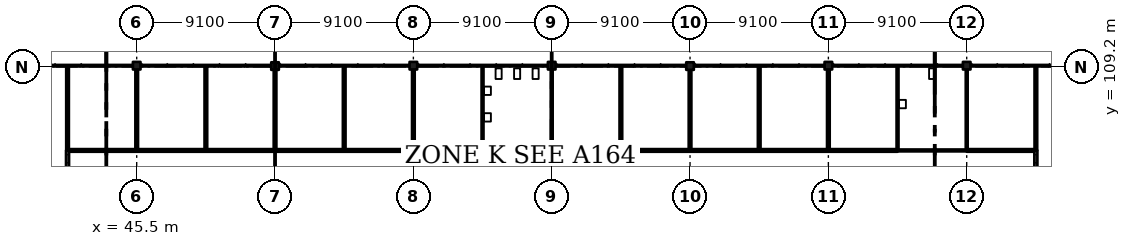
"""IFC4 building model, lengths in metres.
Left out: names, types, materials, properties, quantities, classifications, styles, units other than length and angle.
Written with IfcOpenShell. Run it as: python <this file> out.ifc"""

import sys

from ifc_helpers import new_model, si_unit, direction, frame, frame_2d, origin, origin_2d, place, context, subcontext, project, spatial, rectangle, extrude, element, fill, save


model = new_model("IFC4")
c1 = context("Model", 3, precision=1e-05, world=origin(), true_north=direction((0.0, 1.0)))
c2 = subcontext(c1, "Body", "Model", "MODEL_VIEW")
j1 = project(units=[si_unit("LENGTHUNIT", "METRE"), si_unit("PLANEANGLEUNIT", "RADIAN")], contexts=[c1])
p1 = place(None, origin())
s1 = spatial("IfcSite", under=j1, at=p1, CompositionType="ELEMENT")
p2 = place(p1, origin())
s2 = spatial("IfcBuilding", under=s1, at=p2, CompositionType="ELEMENT")
p3 = place(p2, frame((0.0, 0.0, 20.02)))
s3 = spatial("IfcBuildingStorey", under=s2, at=p3, CompositionType="ELEMENT", Elevation=20.02)
for number, where, z_axis, x_axis in (
    (1, (45.5, 109.275, 0.0), (0.0, 0.0, 1.0), (1.0, 0.0, 0.0)),
    (2, (54.6, 109.25, 0.0), (0.0, 0.0, 1.0), (1.0, 0.0, 0.0)),
    (3, (63.7, 109.275, 0.0), (0.0, 0.0, 1.0), (1.0, 0.0, 0.0)),
    (4, (72.8, 109.275, 0.0), (0.0, 0.0, 1.0), (1.0, 0.0, 0.0)),
    (5, (81.9, 109.25, 0.0), (0.0, 0.0, 1.0), (1.0, 0.0, 0.0)),
    (6, (91.0, 109.275, 0.0), (0.0, 0.0, 1.0), (1.0, 0.0, 0.0)),
    (7, (100.1, 109.275, 0.0), (0.0, 0.0, 1.0), (1.0, 0.0, 0.0)),
):
    element("IfcColumn", number, at=place(p3, frame(where, z_axis=z_axis, x_axis=x_axis)), inside=s3, PredefinedType="COLUMN", context=c2, shape_type="SweptSolid", body=[
        extrude(rectangle(XDim=0.5, YDim=0.5, at=origin_2d()), origin(), (0.0, 0.0, 1.0), 4.55),
    ])
p4 = place(p3, frame((40.95, 103.7, 0.0), z_axis=(0.0, 0.0, 1.0), x_axis=(0.0, -1.0, 0.0)))
e8 = element("IfcWall", 8, at=p4, inside=s3, PredefinedType="PARTITIONING", context=c2, shape_type="SweptSolid", body=[
    extrude(rectangle(XDim=3.57, YDim=0.2, at=frame_2d((1.785, 0.0))), origin(), (0.0, 0.0, 1.0), 4.25),
])
p5 = place(p4, frame((0.55, 0.0, 0.0)))
e9 = element("IfcOpeningElement", 9, at=p5, cuts=e8, PredefinedType="OPENING", context=c2, shape_type="SweptSolid", body=[
    extrude(rectangle(XDim=2.4, YDim=2.4, at=frame_2d((1.2, 1.2))), frame((0.0, 0.11, 0.0), z_axis=(0.0, -1.0, 0.0), x_axis=(1.0, 0.0, 0.0)), (0.0, 0.0, 1.0), 0.22),
])
p6 = place(p3, frame((40.95, 103.7, 0.0), z_axis=(0.0, 0.0, 1.0), x_axis=(0.0, 1.0, 0.0)))
e10 = element("IfcWall", 10, at=p6, inside=s3, PredefinedType="PARTITIONING", context=c2, shape_type="SweptSolid", body=[
    extrude(rectangle(XDim=5.47, YDim=0.175, at=frame_2d((2.735, 0.0))), origin(), (0.0, 0.0, 1.0), 4.25),
])
p7 = place(p3, frame((41.05, 103.7, 0.0), z_axis=(0.0, 0.0, 1.0), x_axis=(1.0, 0.0, 0.0)))
e11 = element("IfcWall", 11, at=p7, inside=s3, PredefinedType="PARTITIONING", context=c2, shape_type="SweptSolid", body=[
    extrude(rectangle(XDim=27.2, YDim=0.175, at=frame_2d((13.6, 0.0))), origin(), (0.0, 0.0, 1.0), 4.25),
])
p8 = place(p7, frame((1.65, 0.0, 0.0)))
e12 = element("IfcOpeningElement", 12, at=p8, cuts=e11, PredefinedType="OPENING", context=c2, shape_type="SweptSolid", body=[
    extrude(rectangle(XDim=1.1, YDim=2.4, at=frame_2d((0.55, 1.2))), frame((0.0, 0.097, 0.0), z_axis=(0.0, -1.0, 0.0), x_axis=(1.0, 0.0, 0.0)), (0.0, 0.0, 1.0), 0.195),
])
p9 = place(p7, frame((6.2, 0.0, 0.0)))
e13 = element("IfcOpeningElement", 13, at=p9, cuts=e11, PredefinedType="OPENING", context=c2, shape_type="SweptSolid", body=[
    extrude(rectangle(XDim=1.1, YDim=2.4, at=frame_2d((0.55, 1.2))), frame((0.0, 0.097, 0.0), z_axis=(0.0, -1.0, 0.0), x_axis=(1.0, 0.0, 0.0)), (0.0, 0.0, 1.0), 0.195),
])
p10 = place(p7, frame((10.75, 0.0, 0.0)))
e14 = element("IfcOpeningElement", 14, at=p10, cuts=e11, PredefinedType="OPENING", context=c2, shape_type="SweptSolid", body=[
    extrude(rectangle(XDim=1.1, YDim=2.4, at=frame_2d((0.55, 1.2))), frame((0.0, 0.097, 0.0), z_axis=(0.0, -1.0, 0.0), x_axis=(1.0, 0.0, 0.0)), (0.0, 0.0, 1.0), 0.195),
])
p11 = place(p7, frame((15.3, 0.0, 0.0)))
e15 = element("IfcOpeningElement", 15, at=p11, cuts=e11, PredefinedType="OPENING", context=c2, shape_type="SweptSolid", body=[
    extrude(rectangle(XDim=1.1, YDim=2.4, at=frame_2d((0.55, 1.2))), frame((0.0, 0.097, 0.0), z_axis=(0.0, -1.0, 0.0), x_axis=(1.0, 0.0, 0.0)), (0.0, 0.0, 1.0), 0.195),
])
p12 = place(p7, frame((19.85, 0.0, 0.0)))
e16 = element("IfcOpeningElement", 16, at=p12, cuts=e11, PredefinedType="OPENING", context=c2, shape_type="SweptSolid", body=[
    extrude(rectangle(XDim=1.1, YDim=2.4, at=frame_2d((0.55, 1.2))), frame((0.0, 0.097, 0.0), z_axis=(0.0, -1.0, 0.0), x_axis=(1.0, 0.0, 0.0)), (0.0, 0.0, 1.0), 0.195),
])
p13 = place(p7, frame((24.4, 0.0, 0.0)))
e17 = element("IfcOpeningElement", 17, at=p13, cuts=e11, PredefinedType="OPENING", context=c2, shape_type="SweptSolid", body=[
    extrude(rectangle(XDim=1.1, YDim=2.4, at=frame_2d((0.55, 1.2))), frame((0.0, 0.097, 0.0), z_axis=(0.0, -1.0, 0.0), x_axis=(1.0, 0.0, 0.0)), (0.0, 0.0, 1.0), 0.195),
])
p14 = place(p3, frame((45.5, 109.025, 0.0), z_axis=(0.0, 0.0, 1.0), x_axis=(0.0, -1.0, 0.0)))
e18 = element("IfcWall", 18, at=p14, inside=s3, PredefinedType="PARTITIONING", context=c2, shape_type="SweptSolid", body=[
    extrude(rectangle(XDim=5.237, YDim=0.175, at=frame_2d((2.619, 0.0))), origin(), (0.0, 0.0, 1.0), 3.55),
])
p15 = place(p3, frame((50.05, 109.17, 0.0), z_axis=(0.0, 0.0, 1.0), x_axis=(0.0, -1.0, 0.0)))
e19 = element("IfcWall", 19, at=p15, inside=s3, PredefinedType="PARTITIONING", context=c2, shape_type="SweptSolid", body=[
    extrude(rectangle(XDim=5.382, YDim=0.175, at=frame_2d((2.691, 0.0))), origin(), (0.0, 0.0, 1.0), 4.25),
])
p16 = place(p3, frame((54.6, 109.0, 0.0), z_axis=(0.0, 0.0, 1.0), x_axis=(0.0, -1.0, 0.0)))
e20 = element("IfcWall", 20, at=p16, inside=s3, PredefinedType="PARTITIONING", context=c2, shape_type="SweptSolid", body=[
    extrude(rectangle(XDim=5.212, YDim=0.175, at=frame_2d((2.606, 0.0))), origin(), (0.0, 0.0, 1.0), 3.55),
])
p17 = place(p3, frame((59.15, 109.17, 0.0), z_axis=(0.0, 0.0, 1.0), x_axis=(0.0, -1.0, 0.0)))
e21 = element("IfcWall", 21, at=p17, inside=s3, PredefinedType="PARTITIONING", context=c2, shape_type="SweptSolid", body=[
    extrude(rectangle(XDim=5.382, YDim=0.175, at=frame_2d((2.691, 0.0))), origin(), (0.0, 0.0, 1.0), 4.25),
])
p18 = place(p3, frame((63.7, 109.025, 0.0), z_axis=(0.0, 0.0, 1.0), x_axis=(0.0, -1.0, 0.0)))
e22 = element("IfcWall", 22, at=p18, inside=s3, PredefinedType="PARTITIONING", context=c2, shape_type="SweptSolid", body=[
    extrude(rectangle(XDim=5.237, YDim=0.175, at=frame_2d((2.619, 0.0))), origin(), (0.0, 0.0, 1.0), 3.55),
])
p19 = place(p3, frame((68.25, 103.7, 0.0), z_axis=(0.0, 0.0, 1.0), x_axis=(1.0, 0.0, 0.0)))
e23 = element("IfcWall", 23, at=p19, inside=s3, PredefinedType="PARTITIONING", context=c2, shape_type="SweptSolid", body=[
    extrude(rectangle(XDim=4.55, YDim=0.125, at=frame_2d((2.275, 0.0))), origin(), (0.0, 0.0, 1.0), 4.25),
])
p20 = place(p19, frame((1.85, 0.0, 0.0)))
e24 = element("IfcOpeningElement", 24, at=p20, cuts=e23, PredefinedType="OPENING", context=c2, shape_type="SweptSolid", body=[
    extrude(rectangle(XDim=0.9, YDim=2.1, at=frame_2d((0.45, 1.05))), frame((0.0, 0.073, 0.0), z_axis=(0.0, -1.0, 0.0), x_axis=(1.0, 0.0, 0.0)), (0.0, 0.0, 1.0), 0.145),
])
p21 = place(p3, frame((68.25, 109.17, 0.0), z_axis=(0.0, 0.0, 1.0), x_axis=(0.0, -1.0, 0.0)))
e25 = element("IfcWall", 25, at=p21, inside=s3, PredefinedType="PARTITIONING", context=c2, shape_type="SweptSolid", body=[
    extrude(rectangle(XDim=5.382, YDim=0.125, at=frame_2d((2.691, 0.0))), origin(), (0.0, 0.0, 1.0), 4.25),
])
p22 = place(p3, frame((72.8, 103.7, 0.0), z_axis=(0.0, 0.0, 1.0), x_axis=(1.0, 0.0, 0.0)))
e26 = element("IfcWall", 26, at=p22, inside=s3, PredefinedType="PARTITIONING", context=c2, shape_type="SweptSolid", body=[
    extrude(rectangle(XDim=22.75, YDim=0.175, at=frame_2d((11.375, 0.0))), origin(), (0.0, 0.0, 1.0), 4.25),
])
p23 = place(p22, frame((10.85, 0.0, 0.0)))
e27 = element("IfcOpeningElement", 27, at=p23, cuts=e26, PredefinedType="OPENING", context=c2, shape_type="SweptSolid", body=[
    extrude(rectangle(XDim=1.1, YDim=2.4, at=frame_2d((0.55, 1.2))), frame((0.0, 0.097, 0.0), z_axis=(0.0, -1.0, 0.0), x_axis=(1.0, 0.0, 0.0)), (0.0, 0.0, 1.0), 0.195),
])
p24 = place(p22, frame((15.4, 0.0, 0.0)))
e28 = element("IfcOpeningElement", 28, at=p24, cuts=e26, PredefinedType="OPENING", context=c2, shape_type="SweptSolid", body=[
    extrude(rectangle(XDim=1.1, YDim=2.4, at=frame_2d((0.55, 1.2))), frame((0.0, 0.097, 0.0), z_axis=(0.0, -1.0, 0.0), x_axis=(1.0, 0.0, 0.0)), (0.0, 0.0, 1.0), 0.195),
])
p25 = place(p22, frame((19.95, 0.0, 0.0)))
e29 = element("IfcOpeningElement", 29, at=p25, cuts=e26, PredefinedType="OPENING", context=c2, shape_type="SweptSolid", body=[
    extrude(rectangle(XDim=1.1, YDim=2.4, at=frame_2d((0.55, 1.2))), frame((0.0, 0.097, 0.0), z_axis=(0.0, -1.0, 0.0), x_axis=(1.0, 0.0, 0.0)), (0.0, 0.0, 1.0), 0.195),
])
p26 = place(p22, frame((1.75, 0.0, 0.0)))
e30 = element("IfcOpeningElement", 30, at=p26, cuts=e26, PredefinedType="OPENING", context=c2, shape_type="SweptSolid", body=[
    extrude(rectangle(XDim=1.1, YDim=2.4, at=frame_2d((0.55, 1.2))), frame((0.0, 0.097, 0.0), z_axis=(0.0, -1.0, 0.0), x_axis=(1.0, 0.0, 0.0)), (0.0, 0.0, 1.0), 0.195),
])
p27 = place(p22, frame((6.3, 0.0, 0.0)))
e31 = element("IfcOpeningElement", 31, at=p27, cuts=e26, PredefinedType="OPENING", context=c2, shape_type="SweptSolid", body=[
    extrude(rectangle(XDim=1.1, YDim=2.4, at=frame_2d((0.55, 1.2))), frame((0.0, 0.097, 0.0), z_axis=(0.0, -1.0, 0.0), x_axis=(1.0, 0.0, 0.0)), (0.0, 0.0, 1.0), 0.195),
])
p28 = place(p3, frame((72.8, 109.025, 0.0), z_axis=(0.0, 0.0, 1.0), x_axis=(0.0, -1.0, 0.0)))
e32 = element("IfcWall", 32, at=p28, inside=s3, PredefinedType="PARTITIONING", context=c2, shape_type="SweptSolid", body=[
    extrude(rectangle(XDim=5.237, YDim=0.125, at=frame_2d((2.619, 0.0))), origin(), (0.0, 0.0, 1.0), 3.55),
])
p29 = place(p3, frame((77.35, 109.17, 0.0), z_axis=(0.0, 0.0, 1.0), x_axis=(0.0, -1.0, 0.0)))
e33 = element("IfcWall", 33, at=p29, inside=s3, PredefinedType="PARTITIONING", context=c2, shape_type="SweptSolid", body=[
    extrude(rectangle(XDim=5.382, YDim=0.175, at=frame_2d((2.691, 0.0))), origin(), (0.0, 0.0, 1.0), 4.25),
])
p30 = place(p3, frame((81.9, 109.0, 0.0), z_axis=(0.0, 0.0, 1.0), x_axis=(0.0, -1.0, 0.0)))
e34 = element("IfcWall", 34, at=p30, inside=s3, PredefinedType="PARTITIONING", context=c2, shape_type="SweptSolid", body=[
    extrude(rectangle(XDim=5.212, YDim=0.175, at=frame_2d((2.606, 0.0))), origin(), (0.0, 0.0, 1.0), 3.55),
])
p31 = place(p3, frame((86.45, 109.17, 0.0), z_axis=(0.0, 0.0, 1.0), x_axis=(0.0, -1.0, 0.0)))
e35 = element("IfcWall", 35, at=p31, inside=s3, PredefinedType="PARTITIONING", context=c2, shape_type="SweptSolid", body=[
    extrude(rectangle(XDim=5.382, YDim=0.175, at=frame_2d((2.691, 0.0))), origin(), (0.0, 0.0, 1.0), 4.25),
])
p32 = place(p3, frame((91.0, 109.025, 0.0), z_axis=(0.0, 0.0, 1.0), x_axis=(0.0, -1.0, 0.0)))
e36 = element("IfcWall", 36, at=p32, inside=s3, PredefinedType="PARTITIONING", context=c2, shape_type="SweptSolid", body=[
    extrude(rectangle(XDim=5.237, YDim=0.175, at=frame_2d((2.619, 0.0))), origin(), (0.0, 0.0, 1.0), 3.55),
])
p33 = place(p3, frame((95.55, 103.7, 0.0), z_axis=(0.0, 0.0, 1.0), x_axis=(1.0, 0.0, 0.0)))
e37 = element("IfcWall", 37, at=p33, inside=s3, PredefinedType="PARTITIONING", context=c2, shape_type="SweptSolid", body=[
    extrude(rectangle(XDim=4.55, YDim=0.125, at=frame_2d((2.275, 0.0))), origin(), (0.0, 0.0, 1.0), 4.25),
])
p34 = place(p33, frame((1.75, 0.0, 0.0)))
e38 = element("IfcOpeningElement", 38, at=p34, cuts=e37, PredefinedType="OPENING", context=c2, shape_type="SweptSolid", body=[
    extrude(rectangle(XDim=1.0, YDim=2.1, at=frame_2d((0.5, 1.05))), frame((0.0, 0.073, 0.0), z_axis=(0.0, -1.0, 0.0), x_axis=(1.0, 0.0, 0.0)), (0.0, 0.0, 1.0), 0.145),
])
p35 = place(p3, frame((95.55, 109.17, 0.0), z_axis=(0.0, 0.0, 1.0), x_axis=(0.0, -1.0, 0.0)))
e39 = element("IfcWall", 39, at=p35, inside=s3, PredefinedType="PARTITIONING", context=c2, shape_type="SweptSolid", body=[
    extrude(rectangle(XDim=5.382, YDim=0.125, at=frame_2d((2.691, 0.0))), origin(), (0.0, 0.0, 1.0), 4.25),
])
p36 = place(p3, frame((100.1, 103.7, 0.0), z_axis=(0.0, 0.0, 1.0), x_axis=(1.0, 0.0, 0.0)))
e40 = element("IfcWall", 40, at=p36, inside=s3, PredefinedType="PARTITIONING", context=c2, shape_type="SweptSolid", body=[
    extrude(rectangle(XDim=4.45, YDim=0.175, at=frame_2d((2.225, 0.0))), origin(), (0.0, 0.0, 1.0), 4.25),
])
p37 = place(p36, frame((1.65, 0.0, 0.0)))
e41 = element("IfcOpeningElement", 41, at=p37, cuts=e40, PredefinedType="OPENING", context=c2, shape_type="SweptSolid", body=[
    extrude(rectangle(XDim=1.1, YDim=2.4, at=frame_2d((0.55, 1.2))), frame((0.0, 0.097, 0.0), z_axis=(0.0, -1.0, 0.0), x_axis=(1.0, 0.0, 0.0)), (0.0, 0.0, 1.0), 0.195),
])
p38 = place(p3, frame((100.1, 109.025, 0.0), z_axis=(0.0, 0.0, 1.0), x_axis=(0.0, -1.0, 0.0)))
e42 = element("IfcWall", 42, at=p38, inside=s3, PredefinedType="PARTITIONING", context=c2, shape_type="SweptSolid", body=[
    extrude(rectangle(XDim=5.237, YDim=0.125, at=frame_2d((2.619, 0.0))), origin(), (0.0, 0.0, 1.0), 3.55),
])
p39 = place(p3, frame((104.65, 100.13, 0.0), z_axis=(0.0, 0.0, 1.0), x_axis=(0.0, 1.0, 0.0)))
e43 = element("IfcWall", 43, at=p39, inside=s3, PredefinedType="PARTITIONING", context=c2, shape_type="SweptSolid", body=[
    extrude(rectangle(XDim=3.57, YDim=0.2, at=frame_2d((1.785, 0.0))), origin(), (0.0, 0.0, 1.0), 4.25),
])
p40 = place(p39, frame((0.55, 0.0, 0.0)))
e44 = element("IfcOpeningElement", 44, at=p40, cuts=e43, PredefinedType="OPENING", context=c2, shape_type="SweptSolid", body=[
    extrude(rectangle(XDim=2.4, YDim=2.4, at=frame_2d((1.2, 1.2))), frame((0.0, 0.11, 0.0), z_axis=(0.0, -1.0, 0.0), x_axis=(1.0, 0.0, 0.0)), (0.0, 0.0, 1.0), 0.22),
])
p41 = place(p3, frame((104.65, 103.7, 0.0), z_axis=(0.0, 0.0, 1.0), x_axis=(0.0, 1.0, 0.0)))
e45 = element("IfcWall", 45, at=p41, inside=s3, PredefinedType="PARTITIONING", context=c2, shape_type="SweptSolid", body=[
    extrude(rectangle(XDim=5.47, YDim=0.175, at=frame_2d((2.735, 0.0))), origin(), (0.0, 0.0, 1.0), 4.25),
])
p42 = place(p8, origin())
e46 = element("IfcDoor", 46, at=p42, inside=s3, OperationType="SINGLE_SWING_RIGHT", PredefinedType="DOOR", context=c2, shape_type="SweptSolid", body=[
    extrude(rectangle(XDim=1.1, YDim=2.4, at=frame_2d((0.55, 1.2))), frame((0.0, 0.025, 0.0), z_axis=(0.0, -1.0, 0.0), x_axis=(1.0, 0.0, 0.0)), (0.0, 0.0, 1.0), 0.05),
])
fill(e12, e46)
p43 = place(p23, origin())
e47 = element("IfcDoor", 47, at=p43, inside=s3, OperationType="SINGLE_SWING_LEFT", PredefinedType="DOOR", context=c2, shape_type="SweptSolid", body=[
    extrude(rectangle(XDim=1.1, YDim=2.4, at=frame_2d((0.55, 1.2))), frame((0.0, 0.025, 0.0), z_axis=(0.0, -1.0, 0.0), x_axis=(1.0, 0.0, 0.0)), (0.0, 0.0, 1.0), 0.05),
])
fill(e27, e47)
p44 = place(p24, origin())
e48 = element("IfcDoor", 48, at=p44, inside=s3, OperationType="SINGLE_SWING_LEFT", PredefinedType="DOOR", context=c2, shape_type="SweptSolid", body=[
    extrude(rectangle(XDim=1.1, YDim=2.4, at=frame_2d((0.55, 1.2))), frame((0.0, 0.025, 0.0), z_axis=(0.0, -1.0, 0.0), x_axis=(1.0, 0.0, 0.0)), (0.0, 0.0, 1.0), 0.05),
])
fill(e28, e48)
p45 = place(p25, origin())
e49 = element("IfcDoor", 49, at=p45, inside=s3, OperationType="SINGLE_SWING_LEFT", PredefinedType="DOOR", context=c2, shape_type="SweptSolid", body=[
    extrude(rectangle(XDim=1.1, YDim=2.4, at=frame_2d((0.55, 1.2))), frame((0.0, 0.025, 0.0), z_axis=(0.0, -1.0, 0.0), x_axis=(1.0, 0.0, 0.0)), (0.0, 0.0, 1.0), 0.05),
])
fill(e29, e49)
p46 = place(p34, origin())
e50 = element("IfcDoor", 50, at=p46, inside=s3, OperationType="SINGLE_SWING_RIGHT", PredefinedType="DOOR", context=c2, shape_type="SweptSolid", body=[
    extrude(rectangle(XDim=1.0, YDim=2.1, at=frame_2d((0.5, 1.05))), frame((0.0, 0.025, 0.0), z_axis=(0.0, -1.0, 0.0), x_axis=(1.0, 0.0, 0.0)), (0.0, 0.0, 1.0), 0.05),
])
fill(e38, e50)
p47 = place(p37, origin())
e51 = element("IfcDoor", 51, at=p47, inside=s3, OperationType="SINGLE_SWING_RIGHT", PredefinedType="DOOR", context=c2, shape_type="SweptSolid", body=[
    extrude(rectangle(XDim=1.1, YDim=2.4, at=frame_2d((0.55, 1.2))), frame((0.0, 0.025, 0.0), z_axis=(0.0, -1.0, 0.0), x_axis=(1.0, 0.0, 0.0)), (0.0, 0.0, 1.0), 0.05),
])
fill(e41, e51)
p48 = place(p9, origin())
e52 = element("IfcDoor", 52, at=p48, inside=s3, OperationType="SINGLE_SWING_LEFT", PredefinedType="DOOR", context=c2, shape_type="SweptSolid", body=[
    extrude(rectangle(XDim=1.1, YDim=2.4, at=frame_2d((0.55, 1.2))), frame((0.0, 0.025, 0.0), z_axis=(0.0, -1.0, 0.0), x_axis=(1.0, 0.0, 0.0)), (0.0, 0.0, 1.0), 0.05),
])
fill(e13, e52)
p49 = place(p10, origin())
e53 = element("IfcDoor", 53, at=p49, inside=s3, OperationType="SINGLE_SWING_LEFT", PredefinedType="DOOR", context=c2, shape_type="SweptSolid", body=[
    extrude(rectangle(XDim=1.1, YDim=2.4, at=frame_2d((0.55, 1.2))), frame((0.0, 0.025, 0.0), z_axis=(0.0, -1.0, 0.0), x_axis=(1.0, 0.0, 0.0)), (0.0, 0.0, 1.0), 0.05),
])
fill(e14, e53)
p50 = place(p11, origin())
e54 = element("IfcDoor", 54, at=p50, inside=s3, OperationType="SINGLE_SWING_LEFT", PredefinedType="DOOR", context=c2, shape_type="SweptSolid", body=[
    extrude(rectangle(XDim=1.1, YDim=2.4, at=frame_2d((0.55, 1.2))), frame((0.0, 0.025, 0.0), z_axis=(0.0, -1.0, 0.0), x_axis=(1.0, 0.0, 0.0)), (0.0, 0.0, 1.0), 0.05),
])
fill(e15, e54)
p51 = place(p12, origin())
e55 = element("IfcDoor", 55, at=p51, inside=s3, OperationType="SINGLE_SWING_LEFT", PredefinedType="DOOR", context=c2, shape_type="SweptSolid", body=[
    extrude(rectangle(XDim=1.1, YDim=2.4, at=frame_2d((0.55, 1.2))), frame((0.0, 0.025, 0.0), z_axis=(0.0, -1.0, 0.0), x_axis=(1.0, 0.0, 0.0)), (0.0, 0.0, 1.0), 0.05),
])
fill(e16, e55)
p52 = place(p13, origin())
e56 = element("IfcDoor", 56, at=p52, inside=s3, OperationType="SINGLE_SWING_LEFT", PredefinedType="DOOR", context=c2, shape_type="SweptSolid", body=[
    extrude(rectangle(XDim=1.1, YDim=2.4, at=frame_2d((0.55, 1.2))), frame((0.0, 0.025, 0.0), z_axis=(0.0, -1.0, 0.0), x_axis=(1.0, 0.0, 0.0)), (0.0, 0.0, 1.0), 0.05),
])
fill(e17, e56)
p53 = place(p20, origin())
e57 = element("IfcDoor", 57, at=p53, inside=s3, OperationType="SINGLE_SWING_LEFT", PredefinedType="DOOR", context=c2, shape_type="SweptSolid", body=[
    extrude(rectangle(XDim=0.9, YDim=2.1, at=frame_2d((0.45, 1.05))), frame((0.0, 0.025, 0.0), z_axis=(0.0, -1.0, 0.0), x_axis=(1.0, 0.0, 0.0)), (0.0, 0.0, 1.0), 0.05),
])
fill(e24, e57)
p54 = place(p26, origin())
e58 = element("IfcDoor", 58, at=p54, inside=s3, OperationType="SINGLE_SWING_LEFT", PredefinedType="DOOR", context=c2, shape_type="SweptSolid", body=[
    extrude(rectangle(XDim=1.1, YDim=2.4, at=frame_2d((0.55, 1.2))), frame((0.0, 0.025, 0.0), z_axis=(0.0, -1.0, 0.0), x_axis=(1.0, 0.0, 0.0)), (0.0, 0.0, 1.0), 0.05),
])
fill(e30, e58)
p55 = place(p27, origin())
e59 = element("IfcDoor", 59, at=p55, inside=s3, OperationType="SINGLE_SWING_LEFT", PredefinedType="DOOR", context=c2, shape_type="SweptSolid", body=[
    extrude(rectangle(XDim=1.1, YDim=2.4, at=frame_2d((0.55, 1.2))), frame((0.0, 0.025, 0.0), z_axis=(0.0, -1.0, 0.0), x_axis=(1.0, 0.0, 0.0)), (0.0, 0.0, 1.0), 0.05),
])
fill(e31, e59)
p56 = place(p40, origin())
e60 = element("IfcDoor", 60, at=p56, inside=s3, OperationType="DOUBLE_DOOR_SINGLE_SWING", PredefinedType="DOOR", context=c2, shape_type="SweptSolid", body=[
    extrude(rectangle(XDim=2.4, YDim=2.4, at=frame_2d((1.2, 1.2))), frame((0.0, 0.025, 0.0), z_axis=(0.0, -1.0, 0.0), x_axis=(1.0, 0.0, 0.0)), (0.0, 0.0, 1.0), 0.05),
])
fill(e44, e60)
p57 = place(p5, origin())
e61 = element("IfcDoor", 61, at=p57, inside=s3, OperationType="DOUBLE_DOOR_SINGLE_SWING", PredefinedType="DOOR", context=c2, shape_type="SweptSolid", body=[
    extrude(rectangle(XDim=2.4, YDim=2.4, at=frame_2d((1.2, 1.2))), frame((0.0, 0.025, 0.0), z_axis=(0.0, -1.0, 0.0), x_axis=(1.0, 0.0, 0.0)), (0.0, 0.0, 1.0), 0.05),
])
fill(e9, e61)
save(model, sys.argv[1])
